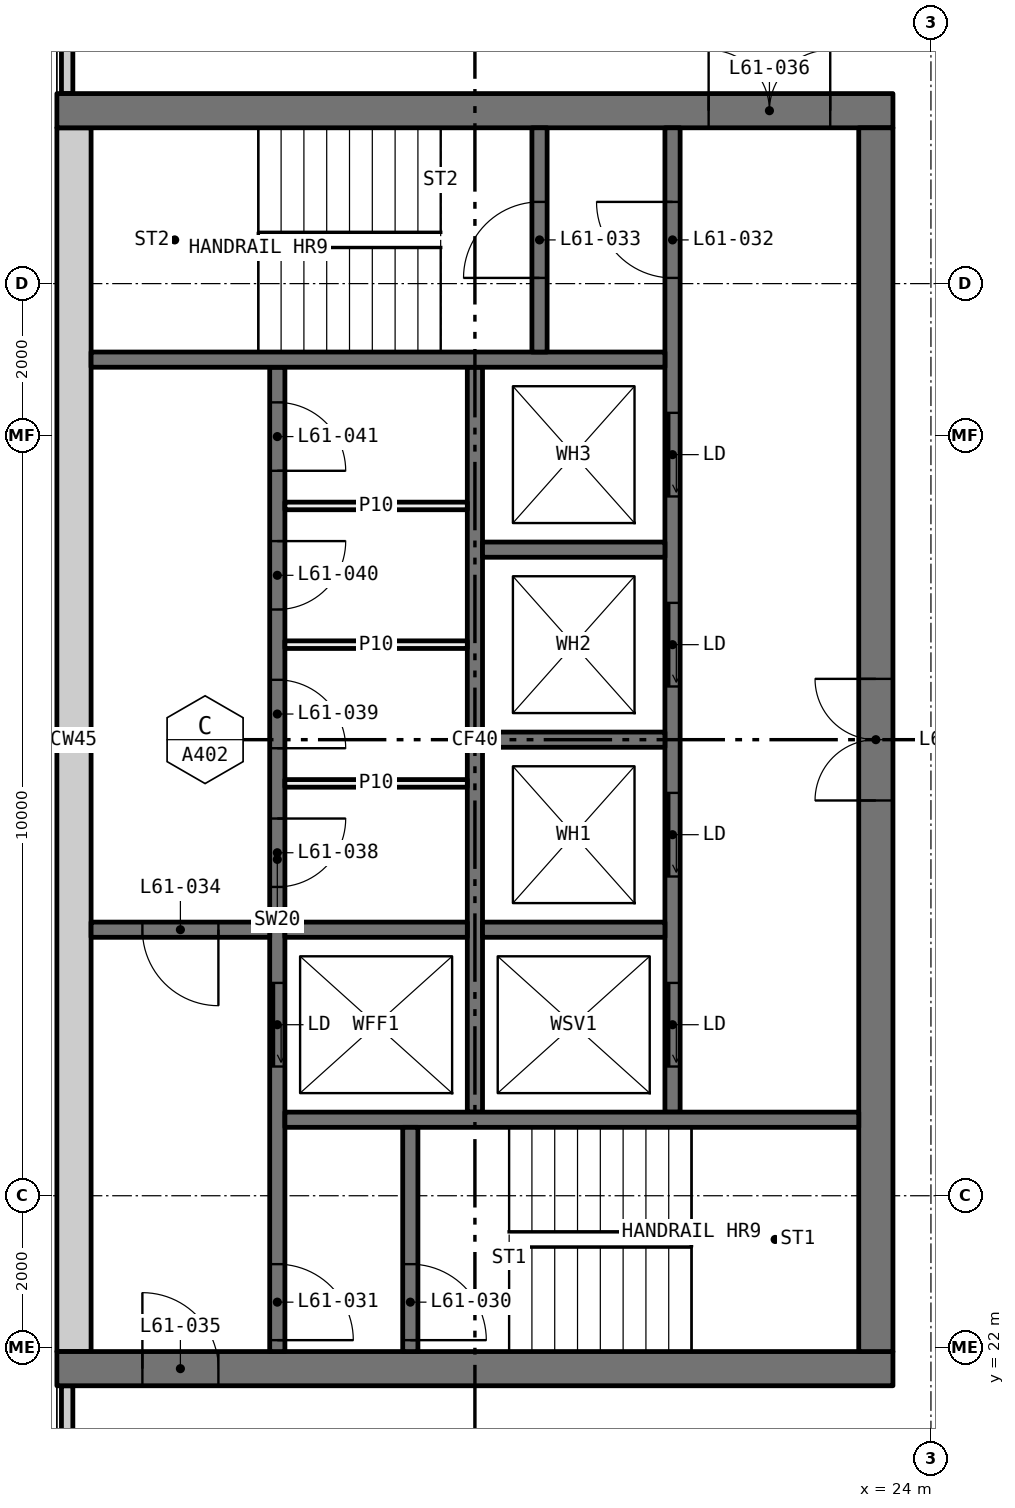
"""IFC4 building model, lengths in metres.
Left out: names, types, materials, properties, quantities, classifications, styles, units other than length and angle.
Written with IfcOpenShell. Run it as: python <this file> out.ifc"""

import sys

from ifc_helpers import new_model, si_unit, direction, frame, frame_2d, origin, place, context, subcontext, project, spatial, rectangle, extrude, element, fill, save


model = new_model("IFC4")
c1 = context("Model", 3, precision=1e-05, world=origin(), true_north=direction((0.0, 1.0)))
c2 = subcontext(c1, "Body", "Model", "MODEL_VIEW")
j1 = project(units=[si_unit("LENGTHUNIT", "METRE"), si_unit("PLANEANGLEUNIT", "RADIAN")], contexts=[c1])
p1 = place(None, origin())
s1 = spatial("IfcSite", under=j1, at=p1, CompositionType="ELEMENT")
p2 = place(p1, origin())
s2 = spatial("IfcBuilding", under=s1, at=p2, CompositionType="ELEMENT")
p3 = place(p2, frame((0.0, 0.0, 228.3)))
s3 = spatial("IfcBuildingStorey", under=s2, at=p3, CompositionType="ELEMENT", Elevation=228.3)
for number, where, z_axis, x_axis in (
    (1, (12.635, 18.71, 0.0), (0.0, 0.0, 1.0), (0.0, 1.0, 0.0)),
    (2, (12.635, 38.5, 0.0), (0.0, 0.0, 1.0), (0.0, 1.0, 0.0)),
):
    element("IfcWall", number, at=place(p3, frame(where, z_axis=z_axis, x_axis=x_axis)), inside=s3, PredefinedType="ELEMENTEDWALL", context=c2, shape_type="SweptSolid", body=[
        extrude(rectangle(XDim=2.79, YDim=0.15, at=frame_2d((1.395, 0.0))), origin(), (0.0, 0.0, 1.0), 3.05),
    ])
p4 = place(p3, frame((12.5, 21.725, 0.0), z_axis=(0.0, 0.0, 1.0), x_axis=(1.0, 0.0, 0.0)))
e3 = element("IfcWall", 3, at=p4, inside=s3, PredefinedType="SHEAR", context=c2, shape_type="SweptSolid", body=[
    extrude(rectangle(XDim=11.0, YDim=0.45, at=frame_2d((5.5, 0.0))), origin(), (0.0, 0.0, 1.0), 3.05),
])
p5 = place(p4, frame((1.125, 0.0, 0.0)))
e4 = element("IfcOpeningElement", 4, at=p5, cuts=e3, PredefinedType="OPENING", context=c2, shape_type="SweptSolid", body=[
    extrude(rectangle(XDim=1.0, YDim=2.1, at=frame_2d((0.5, 1.05))), frame((0.0, 0.235, 0.0), z_axis=(0.0, -1.0, 0.0), x_axis=(1.0, 0.0, 0.0)), (0.0, 0.0, 1.0), 0.47),
])
p6 = place(p3, frame((12.5, 38.275, 0.0), z_axis=(0.0, 0.0, 1.0), x_axis=(1.0, 0.0, 0.0)))
e5 = element("IfcWall", 5, at=p6, inside=s3, PredefinedType="SHEAR", context=c2, shape_type="SweptSolid", body=[
    extrude(rectangle(XDim=11.0, YDim=0.45, at=frame_2d((5.5, 0.0))), origin(), (0.0, 0.0, 1.0), 3.05),
])
p7 = place(p6, frame((8.575, 0.0, 0.0)))
e6 = element("IfcOpeningElement", 6, at=p7, cuts=e5, PredefinedType="OPENING", context=c2, shape_type="SweptSolid", body=[
    extrude(rectangle(XDim=1.6, YDim=2.1, at=frame_2d((0.8, 1.05))), frame((0.0, 0.235, 0.0), z_axis=(0.0, -1.0, 0.0), x_axis=(1.0, 0.0, 0.0)), (0.0, 0.0, 1.0), 0.47),
])
p8 = place(p3, frame((12.725, 21.95, 0.0), z_axis=(0.0, 0.0, 1.0), x_axis=(0.0, 1.0, 0.0)))
e7 = element("IfcWall", 7, at=p8, inside=s3, PredefinedType="SHEAR", context=c2, shape_type="SweptSolid", body=[
    extrude(rectangle(XDim=16.1, YDim=0.45, at=frame_2d((8.05, 0.0))), origin(), (0.0, 0.0, 1.0), 3.05),
])
p9 = place(p3, frame((23.275, 21.95, 0.0), z_axis=(0.0, 0.0, 1.0), x_axis=(0.0, 1.0, 0.0)))
e8 = element("IfcWall", 8, at=p9, inside=s3, PredefinedType="SHEAR", context=c2, shape_type="SweptSolid", body=[
    extrude(rectangle(XDim=16.1, YDim=0.45, at=frame_2d((8.05, 0.0))), origin(), (0.0, 0.0, 1.0), 3.05),
])
p10 = place(p9, frame((7.25, 0.0, 0.0)))
e9 = element("IfcOpeningElement", 9, at=p10, cuts=e8, PredefinedType="OPENING", context=c2, shape_type="SweptSolid", body=[
    extrude(rectangle(XDim=1.6, YDim=2.1, at=frame_2d((0.8, 1.05))), frame((0.0, 0.235, 0.0), z_axis=(0.0, -1.0, 0.0), x_axis=(1.0, 0.0, 0.0)), (0.0, 0.0, 1.0), 0.47),
])
p11 = place(p3, frame((15.4, 21.95, 0.0), z_axis=(0.0, 0.0, 1.0), x_axis=(0.0, 1.0, 0.0)))
e10 = element("IfcWall", 10, at=p11, inside=s3, PredefinedType="SOLIDWALL", context=c2, shape_type="SweptSolid", body=[
    extrude(rectangle(XDim=12.95, YDim=0.2, at=frame_2d((6.475, 0.0))), origin(), (0.0, 0.0, 1.0), 3.05),
])
p12 = place(p11, frame((3.75, 0.0, 0.0)))
e11 = element("IfcOpeningElement", 11, at=p12, cuts=e10, PredefinedType="OPENING", context=c2, shape_type="SweptSolid", body=[
    extrude(rectangle(XDim=1.1, YDim=2.1, at=frame_2d((0.55, 1.05))), frame((0.0, 0.11, 0.0), z_axis=(0.0, -1.0, 0.0), x_axis=(1.0, 0.0, 0.0)), (0.0, 0.0, 1.0), 0.22),
])
p13 = place(p11, frame((0.15, 0.0, 0.0)))
e12 = element("IfcOpeningElement", 12, at=p13, cuts=e10, PredefinedType="OPENING", context=c2, shape_type="SweptSolid", body=[
    extrude(rectangle(XDim=1.0, YDim=2.1, at=frame_2d((0.5, 1.05))), frame((0.0, 0.11, 0.0), z_axis=(0.0, -1.0, 0.0), x_axis=(1.0, 0.0, 0.0)), (0.0, 0.0, 1.0), 0.22),
])
p14 = place(p11, frame((6.113, 0.0, 0.0)))
e13 = element("IfcOpeningElement", 13, at=p14, cuts=e10, PredefinedType="OPENING", context=c2, shape_type="SweptSolid", body=[
    extrude(rectangle(XDim=0.9, YDim=2.1, at=frame_2d((0.45, 1.05))), frame((0.0, 0.11, 0.0), z_axis=(0.0, -1.0, 0.0), x_axis=(1.0, 0.0, 0.0)), (0.0, 0.0, 1.0), 0.22),
])
p15 = place(p11, frame((7.938, 0.0, 0.0)))
e14 = element("IfcOpeningElement", 14, at=p15, cuts=e10, PredefinedType="OPENING", context=c2, shape_type="SweptSolid", body=[
    extrude(rectangle(XDim=0.9, YDim=2.1, at=frame_2d((0.45, 1.05))), frame((0.0, 0.11, 0.0), z_axis=(0.0, -1.0, 0.0), x_axis=(1.0, 0.0, 0.0)), (0.0, 0.0, 1.0), 0.22),
])
p16 = place(p11, frame((9.762, 0.0, 0.0)))
e15 = element("IfcOpeningElement", 15, at=p16, cuts=e10, PredefinedType="OPENING", context=c2, shape_type="SweptSolid", body=[
    extrude(rectangle(XDim=0.9, YDim=2.1, at=frame_2d((0.45, 1.05))), frame((0.0, 0.11, 0.0), z_axis=(0.0, -1.0, 0.0), x_axis=(1.0, 0.0, 0.0)), (0.0, 0.0, 1.0), 0.22),
])
p17 = place(p11, frame((11.587, 0.0, 0.0)))
e16 = element("IfcOpeningElement", 16, at=p17, cuts=e10, PredefinedType="OPENING", context=c2, shape_type="SweptSolid", body=[
    extrude(rectangle(XDim=0.9, YDim=2.1, at=frame_2d((0.45, 1.05))), frame((0.0, 0.11, 0.0), z_axis=(0.0, -1.0, 0.0), x_axis=(1.0, 0.0, 0.0)), (0.0, 0.0, 1.0), 0.22),
])
p18 = place(p3, frame((20.6, 25.1, 0.0), z_axis=(0.0, 0.0, 1.0), x_axis=(0.0, 1.0, 0.0)))
e17 = element("IfcWall", 17, at=p18, inside=s3, PredefinedType="SOLIDWALL", context=c2, shape_type="SweptSolid", body=[
    extrude(rectangle(XDim=12.95, YDim=0.2, at=frame_2d((6.475, 0.0))), origin(), (0.0, 0.0, 1.0), 3.05),
])
p19 = place(p18, frame((0.6, 0.0, 0.0)))
e18 = element("IfcOpeningElement", 18, at=p19, cuts=e17, PredefinedType="OPENING", context=c2, shape_type="SweptSolid", body=[
    extrude(rectangle(XDim=1.1, YDim=2.1, at=frame_2d((0.55, 1.05))), frame((0.0, 0.11, 0.0), z_axis=(0.0, -1.0, 0.0), x_axis=(1.0, 0.0, 0.0)), (0.0, 0.0, 1.0), 0.22),
])
p20 = place(p18, frame((3.1, 0.0, 0.0)))
e19 = element("IfcOpeningElement", 19, at=p20, cuts=e17, PredefinedType="OPENING", context=c2, shape_type="SweptSolid", body=[
    extrude(rectangle(XDim=1.1, YDim=2.1, at=frame_2d((0.55, 1.05))), frame((0.0, 0.11, 0.0), z_axis=(0.0, -1.0, 0.0), x_axis=(1.0, 0.0, 0.0)), (0.0, 0.0, 1.0), 0.22),
])
p21 = place(p18, frame((5.6, 0.0, 0.0)))
e20 = element("IfcOpeningElement", 20, at=p21, cuts=e17, PredefinedType="OPENING", context=c2, shape_type="SweptSolid", body=[
    extrude(rectangle(XDim=1.1, YDim=2.1, at=frame_2d((0.55, 1.05))), frame((0.0, 0.11, 0.0), z_axis=(0.0, -1.0, 0.0), x_axis=(1.0, 0.0, 0.0)), (0.0, 0.0, 1.0), 0.22),
])
p22 = place(p18, frame((8.1, 0.0, 0.0)))
e21 = element("IfcOpeningElement", 21, at=p22, cuts=e17, PredefinedType="OPENING", context=c2, shape_type="SweptSolid", body=[
    extrude(rectangle(XDim=1.1, YDim=2.1, at=frame_2d((0.55, 1.05))), frame((0.0, 0.11, 0.0), z_axis=(0.0, -1.0, 0.0), x_axis=(1.0, 0.0, 0.0)), (0.0, 0.0, 1.0), 0.22),
])
p23 = place(p18, frame((10.975, 0.0, 0.0)))
e22 = element("IfcOpeningElement", 22, at=p23, cuts=e17, PredefinedType="OPENING", context=c2, shape_type="SweptSolid", body=[
    extrude(rectangle(XDim=1.0, YDim=2.1, at=frame_2d((0.5, 1.05))), frame((0.0, 0.11, 0.0), z_axis=(0.0, -1.0, 0.0), x_axis=(1.0, 0.0, 0.0)), (0.0, 0.0, 1.0), 0.22),
])
p24 = place(p3, frame((18.0, 25.1, 0.0), z_axis=(0.0, 0.0, 1.0), x_axis=(0.0, 1.0, 0.0)))
e23 = element("IfcWall", 23, at=p24, inside=s3, PredefinedType="SOLIDWALL", context=c2, shape_type="SweptSolid", body=[
    extrude(rectangle(XDim=9.8, YDim=0.2, at=frame_2d((4.9, 0.0))), origin(), (0.0, 0.0, 1.0), 3.05),
])
for number, where, z_axis, x_axis in (
    (24, (15.5, 25.0, 0.0), (0.0, 0.0, 1.0), (1.0, 0.0, 0.0)),
    (25, (12.95, 35.0, 0.0), (0.0, 0.0, 1.0), (1.0, 0.0, 0.0)),
):
    element("IfcWall", number, at=place(p3, frame(where, z_axis=z_axis, x_axis=x_axis)), inside=s3, PredefinedType="SOLIDWALL", context=c2, shape_type="SweptSolid", body=[
        extrude(rectangle(XDim=7.55, YDim=0.2, at=frame_2d((3.775, 0.0))), origin(), (0.0, 0.0, 1.0), 3.05),
    ])
p25 = place(p3, frame((12.95, 27.5, 0.0), z_axis=(0.0, 0.0, 1.0), x_axis=(1.0, 0.0, 0.0)))
e26 = element("IfcWall", 26, at=p25, inside=s3, PredefinedType="SOLIDWALL", context=c2, shape_type="SweptSolid", body=[
    extrude(rectangle(XDim=2.35, YDim=0.2, at=frame_2d((1.175, 0.0))), origin(), (0.0, 0.0, 1.0), 3.05),
])
p26 = place(p25, frame((0.675, 0.0, 0.0)))
e27 = element("IfcOpeningElement", 27, at=p26, cuts=e26, PredefinedType="OPENING", context=c2, shape_type="SweptSolid", body=[
    extrude(rectangle(XDim=1.0, YDim=2.1, at=frame_2d((0.5, 1.05))), frame((0.0, 0.11, 0.0), z_axis=(0.0, -1.0, 0.0), x_axis=(1.0, 0.0, 0.0)), (0.0, 0.0, 1.0), 0.22),
])
p27 = place(p3, frame((17.15, 21.95, 0.0), z_axis=(0.0, 0.0, 1.0), x_axis=(0.0, 1.0, 0.0)))
e28 = element("IfcWall", 28, at=p27, inside=s3, PredefinedType="SOLIDWALL", context=c2, shape_type="SweptSolid", body=[
    extrude(rectangle(XDim=2.95, YDim=0.2, at=frame_2d((1.475, 0.0))), origin(), (0.0, 0.0, 1.0), 3.05),
])
p28 = place(p27, frame((0.15, 0.0, 0.0)))
e29 = element("IfcOpeningElement", 29, at=p28, cuts=e28, PredefinedType="OPENING", context=c2, shape_type="SweptSolid", body=[
    extrude(rectangle(XDim=1.0, YDim=2.1, at=frame_2d((0.5, 1.05))), frame((0.0, 0.11, 0.0), z_axis=(0.0, -1.0, 0.0), x_axis=(1.0, 0.0, 0.0)), (0.0, 0.0, 1.0), 0.22),
])
p29 = place(p3, frame((18.85, 35.1, 0.0), z_axis=(0.0, 0.0, 1.0), x_axis=(0.0, 1.0, 0.0)))
e30 = element("IfcWall", 30, at=p29, inside=s3, PredefinedType="SOLIDWALL", context=c2, shape_type="SweptSolid", body=[
    extrude(rectangle(XDim=2.95, YDim=0.2, at=frame_2d((1.475, 0.0))), origin(), (0.0, 0.0, 1.0), 3.05),
])
p30 = place(p29, frame((0.975, 0.0, 0.0)))
e31 = element("IfcOpeningElement", 31, at=p30, cuts=e30, PredefinedType="OPENING", context=c2, shape_type="SweptSolid", body=[
    extrude(rectangle(XDim=1.0, YDim=2.1, at=frame_2d((0.5, 1.05))), frame((0.0, 0.11, 0.0), z_axis=(0.0, -1.0, 0.0), x_axis=(1.0, 0.0, 0.0)), (0.0, 0.0, 1.0), 0.22),
])
for number, where, z_axis, x_axis in (
    (32, (15.5, 27.5, 0.0), (0.0, 0.0, 1.0), (1.0, 0.0, 0.0)),
    (33, (18.1, 27.5, 0.0), (0.0, 0.0, 1.0), (1.0, 0.0, 0.0)),
    (34, (18.1, 30.0, 0.0), (0.0, 0.0, 1.0), (1.0, 0.0, 0.0)),
    (35, (18.1, 32.5, 0.0), (0.0, 0.0, 1.0), (1.0, 0.0, 0.0)),
):
    element("IfcWall", number, at=place(p3, frame(where, z_axis=z_axis, x_axis=x_axis)), inside=s3, PredefinedType="SOLIDWALL", context=c2, shape_type="SweptSolid", body=[
        extrude(rectangle(XDim=2.4, YDim=0.2, at=frame_2d((1.2, 0.0))), origin(), (0.0, 0.0, 1.0), 3.05),
    ])
for number, where, z_axis, x_axis in (
    (36, (15.5, 29.425, 0.0), (0.0, 0.0, 1.0), (1.0, 0.0, 0.0)),
    (37, (15.5, 31.25, 0.0), (0.0, 0.0, 1.0), (1.0, 0.0, 0.0)),
    (38, (15.5, 33.075, 0.0), (0.0, 0.0, 1.0), (1.0, 0.0, 0.0)),
):
    element("IfcWall", number, at=place(p3, frame(where, z_axis=z_axis, x_axis=x_axis)), inside=s3, PredefinedType="PARTITIONING", context=c2, shape_type="SweptSolid", body=[
        extrude(rectangle(XDim=2.4, YDim=0.1, at=frame_2d((1.2, 0.0))), origin(), (0.0, 0.0, 1.0), 3.05),
    ])
p31 = place(p19, origin())
e39 = element("IfcDoor", 39, at=p31, inside=s3, OperationType="SLIDING_TO_LEFT", PredefinedType="DOOR", context=c2, shape_type="SweptSolid", body=[
    extrude(rectangle(XDim=1.1, YDim=2.1, at=frame_2d((0.55, 1.05))), frame((0.0, 0.025, 0.0), z_axis=(0.0, -1.0, 0.0), x_axis=(1.0, 0.0, 0.0)), (0.0, 0.0, 1.0), 0.05),
])
fill(e18, e39)
p32 = place(p20, origin())
e40 = element("IfcDoor", 40, at=p32, inside=s3, OperationType="SLIDING_TO_LEFT", PredefinedType="DOOR", context=c2, shape_type="SweptSolid", body=[
    extrude(rectangle(XDim=1.1, YDim=2.1, at=frame_2d((0.55, 1.05))), frame((0.0, 0.025, 0.0), z_axis=(0.0, -1.0, 0.0), x_axis=(1.0, 0.0, 0.0)), (0.0, 0.0, 1.0), 0.05),
])
fill(e19, e40)
p33 = place(p21, origin())
e41 = element("IfcDoor", 41, at=p33, inside=s3, OperationType="SLIDING_TO_LEFT", PredefinedType="DOOR", context=c2, shape_type="SweptSolid", body=[
    extrude(rectangle(XDim=1.1, YDim=2.1, at=frame_2d((0.55, 1.05))), frame((0.0, 0.025, 0.0), z_axis=(0.0, -1.0, 0.0), x_axis=(1.0, 0.0, 0.0)), (0.0, 0.0, 1.0), 0.05),
])
fill(e20, e41)
p34 = place(p22, origin())
e42 = element("IfcDoor", 42, at=p34, inside=s3, OperationType="SLIDING_TO_LEFT", PredefinedType="DOOR", context=c2, shape_type="SweptSolid", body=[
    extrude(rectangle(XDim=1.1, YDim=2.1, at=frame_2d((0.55, 1.05))), frame((0.0, 0.025, 0.0), z_axis=(0.0, -1.0, 0.0), x_axis=(1.0, 0.0, 0.0)), (0.0, 0.0, 1.0), 0.05),
])
fill(e21, e42)
p35 = place(p12, origin())
e43 = element("IfcDoor", 43, at=p35, inside=s3, OperationType="SLIDING_TO_LEFT", PredefinedType="DOOR", context=c2, shape_type="SweptSolid", body=[
    extrude(rectangle(XDim=1.1, YDim=2.1, at=frame_2d((0.55, 1.05))), frame((0.0, 0.025, 0.0), z_axis=(0.0, -1.0, 0.0), x_axis=(1.0, 0.0, 0.0)), (0.0, 0.0, 1.0), 0.05),
])
fill(e11, e43)
p36 = place(p28, frame((1.0, 0.0, 0.0), x_axis=(-1.0, 0.0, 0.0)))
e44 = element("IfcDoor", 44, at=p36, inside=s3, OperationType="SINGLE_SWING_LEFT", PredefinedType="DOOR", context=c2, shape_type="SweptSolid", body=[
    extrude(rectangle(XDim=1.0, YDim=2.1, at=frame_2d((0.5, 1.05))), frame((0.0, 0.025, 0.0), z_axis=(0.0, -1.0, 0.0), x_axis=(1.0, 0.0, 0.0)), (0.0, 0.0, 1.0), 0.05),
])
fill(e29, e44)
p37 = place(p13, frame((1.0, 0.0, 0.0), x_axis=(-1.0, 0.0, 0.0)))
e45 = element("IfcDoor", 45, at=p37, inside=s3, OperationType="SINGLE_SWING_LEFT", PredefinedType="DOOR", context=c2, shape_type="SweptSolid", body=[
    extrude(rectangle(XDim=1.0, YDim=2.1, at=frame_2d((0.5, 1.05))), frame((0.0, 0.025, 0.0), z_axis=(0.0, -1.0, 0.0), x_axis=(1.0, 0.0, 0.0)), (0.0, 0.0, 1.0), 0.05),
])
fill(e12, e45)
p38 = place(p23, origin())
e46 = element("IfcDoor", 46, at=p38, inside=s3, OperationType="SINGLE_SWING_LEFT", PredefinedType="DOOR", context=c2, shape_type="SweptSolid", body=[
    extrude(rectangle(XDim=1.0, YDim=2.1, at=frame_2d((0.5, 1.05))), frame((0.0, 0.025, 0.0), z_axis=(0.0, -1.0, 0.0), x_axis=(1.0, 0.0, 0.0)), (0.0, 0.0, 1.0), 0.05),
])
fill(e22, e46)
p39 = place(p30, origin())
e47 = element("IfcDoor", 47, at=p39, inside=s3, OperationType="SINGLE_SWING_RIGHT", PredefinedType="DOOR", context=c2, shape_type="SweptSolid", body=[
    extrude(rectangle(XDim=1.0, YDim=2.1, at=frame_2d((0.5, 1.05))), frame((0.0, 0.025, 0.0), z_axis=(0.0, -1.0, 0.0), x_axis=(1.0, 0.0, 0.0)), (0.0, 0.0, 1.0), 0.05),
])
fill(e31, e47)
p40 = place(p26, frame((1.0, 0.0, 0.0), x_axis=(-1.0, 0.0, 0.0)))
e48 = element("IfcDoor", 48, at=p40, inside=s3, OperationType="SINGLE_SWING_RIGHT", PredefinedType="DOOR", context=c2, shape_type="SweptSolid", body=[
    extrude(rectangle(XDim=1.0, YDim=2.1, at=frame_2d((0.5, 1.05))), frame((0.0, 0.025, 0.0), z_axis=(0.0, -1.0, 0.0), x_axis=(1.0, 0.0, 0.0)), (0.0, 0.0, 1.0), 0.05),
])
fill(e27, e48)
p41 = place(p5, origin())
e49 = element("IfcDoor", 49, at=p41, inside=s3, OperationType="SINGLE_SWING_RIGHT", PredefinedType="DOOR", context=c2, shape_type="SweptSolid", body=[
    extrude(rectangle(XDim=1.0, YDim=2.1, at=frame_2d((0.5, 1.05))), frame((0.0, 0.025, 0.0), z_axis=(0.0, -1.0, 0.0), x_axis=(1.0, 0.0, 0.0)), (0.0, 0.0, 1.0), 0.05),
])
fill(e4, e49)
p42 = place(p7, origin())
e50 = element("IfcDoor", 50, at=p42, inside=s3, OperationType="DOUBLE_DOOR_SINGLE_SWING", PredefinedType="DOOR", context=c2, shape_type="SweptSolid", body=[
    extrude(rectangle(XDim=1.6, YDim=2.1, at=frame_2d((0.8, 1.05))), frame((0.0, 0.025, 0.0), z_axis=(0.0, -1.0, 0.0), x_axis=(1.0, 0.0, 0.0)), (0.0, 0.0, 1.0), 0.05),
])
fill(e6, e50)
p43 = place(p10, origin())
e51 = element("IfcDoor", 51, at=p43, inside=s3, OperationType="DOUBLE_DOOR_SINGLE_SWING", PredefinedType="DOOR", context=c2, shape_type="SweptSolid", body=[
    extrude(rectangle(XDim=1.6, YDim=2.1, at=frame_2d((0.8, 1.05))), frame((0.0, 0.025, 0.0), z_axis=(0.0, -1.0, 0.0), x_axis=(1.0, 0.0, 0.0)), (0.0, 0.0, 1.0), 0.05),
])
fill(e9, e51)
p44 = place(p14, frame((0.9, 0.0, 0.0), x_axis=(-1.0, 0.0, 0.0)))
e52 = element("IfcDoor", 52, at=p44, inside=s3, OperationType="SINGLE_SWING_RIGHT", PredefinedType="DOOR", context=c2, shape_type="SweptSolid", body=[
    extrude(rectangle(XDim=0.9, YDim=2.1, at=frame_2d((0.45, 1.05))), frame((0.0, 0.025, 0.0), z_axis=(0.0, -1.0, 0.0), x_axis=(1.0, 0.0, 0.0)), (0.0, 0.0, 1.0), 0.05),
])
fill(e13, e52)
p45 = place(p15, frame((0.9, 0.0, 0.0), x_axis=(-1.0, 0.0, 0.0)))
e53 = element("IfcDoor", 53, at=p45, inside=s3, OperationType="SINGLE_SWING_LEFT", PredefinedType="DOOR", context=c2, shape_type="SweptSolid", body=[
    extrude(rectangle(XDim=0.9, YDim=2.1, at=frame_2d((0.45, 1.05))), frame((0.0, 0.025, 0.0), z_axis=(0.0, -1.0, 0.0), x_axis=(1.0, 0.0, 0.0)), (0.0, 0.0, 1.0), 0.05),
])
fill(e14, e53)
p46 = place(p16, frame((0.9, 0.0, 0.0), x_axis=(-1.0, 0.0, 0.0)))
e54 = element("IfcDoor", 54, at=p46, inside=s3, OperationType="SINGLE_SWING_RIGHT", PredefinedType="DOOR", context=c2, shape_type="SweptSolid", body=[
    extrude(rectangle(XDim=0.9, YDim=2.1, at=frame_2d((0.45, 1.05))), frame((0.0, 0.025, 0.0), z_axis=(0.0, -1.0, 0.0), x_axis=(1.0, 0.0, 0.0)), (0.0, 0.0, 1.0), 0.05),
])
fill(e15, e54)
p47 = place(p17, frame((0.9, 0.0, 0.0), x_axis=(-1.0, 0.0, 0.0)))
e55 = element("IfcDoor", 55, at=p47, inside=s3, OperationType="SINGLE_SWING_LEFT", PredefinedType="DOOR", context=c2, shape_type="SweptSolid", body=[
    extrude(rectangle(XDim=0.9, YDim=2.1, at=frame_2d((0.45, 1.05))), frame((0.0, 0.025, 0.0), z_axis=(0.0, -1.0, 0.0), x_axis=(1.0, 0.0, 0.0)), (0.0, 0.0, 1.0), 0.05),
])
fill(e16, e55)
save(model, sys.argv[1])
